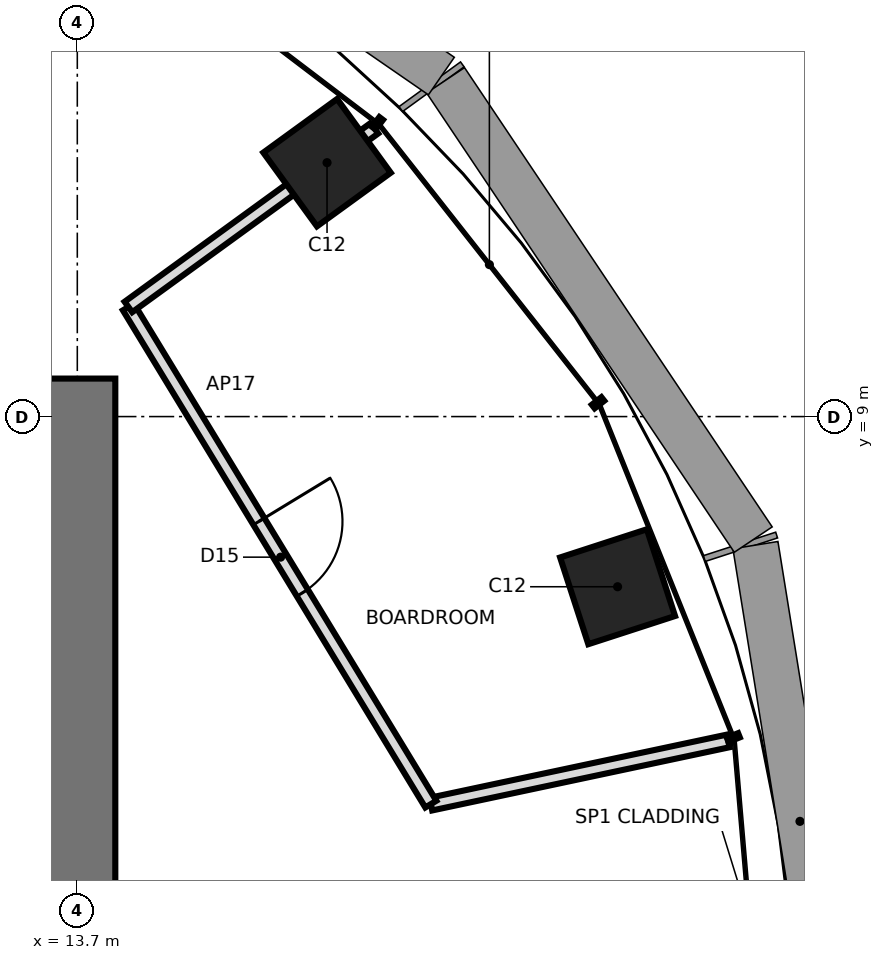
"""IFC4 building model, lengths in metres.
Left out: names, types, materials, properties, quantities, classifications, styles, units other than length and angle.
Written with IfcOpenShell. Run it as: python <this file> out.ifc"""

import sys

from ifc_helpers import new_model, si_unit, direction, frame, frame_2d, origin, origin_2d, place, context, subcontext, project, spatial, rectangle, extrude, element, fill, save


model = new_model("IFC4")
c1 = context("Model", 3, precision=1e-05, world=origin(), true_north=direction((0.0, 1.0)))
c2 = subcontext(c1, "Body", "Model", "MODEL_VIEW")
j1 = project(units=[si_unit("LENGTHUNIT", "METRE"), si_unit("PLANEANGLEUNIT", "RADIAN")], contexts=[c1])
p1 = place(None, origin())
s1 = spatial("IfcSite", under=j1, at=p1, CompositionType="ELEMENT")
p2 = place(p1, origin())
s2 = spatial("IfcBuilding", under=s1, at=p2, CompositionType="ELEMENT")
p3 = place(p2, frame((0.0, 0.0, 256.0)))
s3 = spatial("IfcBuildingStorey", under=s2, at=p3, CompositionType="ELEMENT", Elevation=256.0)
for number, where, z_axis, x_axis in (
    (1, (20.808, 6.761, 0.0), (0.0, 0.0, 1.0), (0.951, 0.309, 0.0)),
    (2, (16.986, 12.341, 0.0), (0.0, 0.0, 1.0), (0.809, 0.588, 0.0)),
):
    element("IfcColumn", number, at=place(p3, frame(where, z_axis=z_axis, x_axis=x_axis)), inside=s3, PredefinedType="COLUMN", context=c2, shape_type="SweptSolid", body=[
        extrude(rectangle(XDim=1.2, YDim=1.2, at=origin_2d()), origin(), (0.0, 0.0, 1.0), 4.2),
    ])
p4 = place(p3, frame((13.7, -9.5, 0.0), z_axis=(0.0, 0.0, 1.0), x_axis=(0.0, 1.0, 0.0)))
e3 = element("IfcWall", 3, at=p4, inside=s3, PredefinedType="SHEAR", context=c2, shape_type="SweptSolid", body=[
    extrude(rectangle(XDim=19.0, YDim=1.0, at=frame_2d((9.5, 0.0))), origin(), (0.0, 0.0, 1.0), 4.2),
])
p5 = place(p4, frame((8.6, 0.0, 0.0)))
e4 = element("IfcOpeningElement", 4, at=p5, cuts=e3, PredefinedType="OPENING", context=c2, shape_type="SweptSolid", body=[
    extrude(rectangle(XDim=1.8, YDim=2.4, at=frame_2d((0.9, 1.2))), frame((0.0, 0.51, 0.0), z_axis=(0.0, -1.0, 0.0), x_axis=(1.0, 0.0, 0.0)), (0.0, 0.0, 1.0), 1.02),
])
p6 = place(p3, frame((18.351, 3.901, 0.0), z_axis=(0.0, 0.0, 1.0), x_axis=(0.978140543132, 0.207944891454, 0.0)))
e5 = element("IfcWall", 5, at=p6, inside=s3, PredefinedType="PARTITIONING", context=c2, shape_type="SweptSolid", body=[
    extrude(rectangle(XDim=4.0, YDim=0.17, at=frame_2d((2.0, 0.0))), origin(), (0.0, 0.0, 1.0), 4.04),
])
p7 = place(p3, frame((14.373, 10.442, 0.0), z_axis=(0.0, 0.0, 1.0), x_axis=(0.519644460078, -0.854382604639, 0.0)))
e6 = element("IfcWall", 6, at=p7, inside=s3, PredefinedType="PARTITIONING", context=c2, shape_type="SweptSolid", body=[
    extrude(rectangle(XDim=7.657, YDim=0.17, at=frame_2d((3.828, 0.0))), origin(), (0.0, 0.0, 1.0), 4.04),
])
p8 = place(p7, frame((3.303, 0.0, 0.0)))
e7 = element("IfcOpeningElement", 7, at=p8, cuts=e6, PredefinedType="OPENING", context=c2, shape_type="SweptSolid", body=[
    extrude(rectangle(XDim=1.1, YDim=2.4, at=frame_2d((0.55, 1.2))), frame((0.0, 0.095, 0.0), z_axis=(0.0, -1.0, 0.0), x_axis=(1.0, 0.0, 0.0)), (0.0, 0.0, 1.0), 0.19),
])
p9 = place(p3, frame((17.609, 12.793, 0.0), z_axis=(0.0, 0.0, 1.0), x_axis=(-0.809026317077, -0.587772420479, 0.0)))
e8 = element("IfcWall", 8, at=p9, inside=s3, PredefinedType="PARTITIONING", context=c2, shape_type="SweptSolid", body=[
    extrude(rectangle(XDim=4.0, YDim=0.17, at=frame_2d((2.0, 0.0))), origin(), (0.0, 0.0, 1.0), 3.24),
])
p10 = place(p8, origin())
e9 = element("IfcDoor", 9, at=p10, inside=s3, OperationType="SINGLE_SWING_LEFT", PredefinedType="DOOR", context=c2, shape_type="SweptSolid", body=[
    extrude(rectangle(XDim=1.1, YDim=2.4, at=frame_2d((0.55, 1.2))), frame((0.0, 0.025, 0.0), z_axis=(0.0, -1.0, 0.0), x_axis=(1.0, 0.0, 0.0)), (0.0, 0.0, 1.0), 0.05),
])
fill(e7, e9)
save(model, sys.argv[1])
